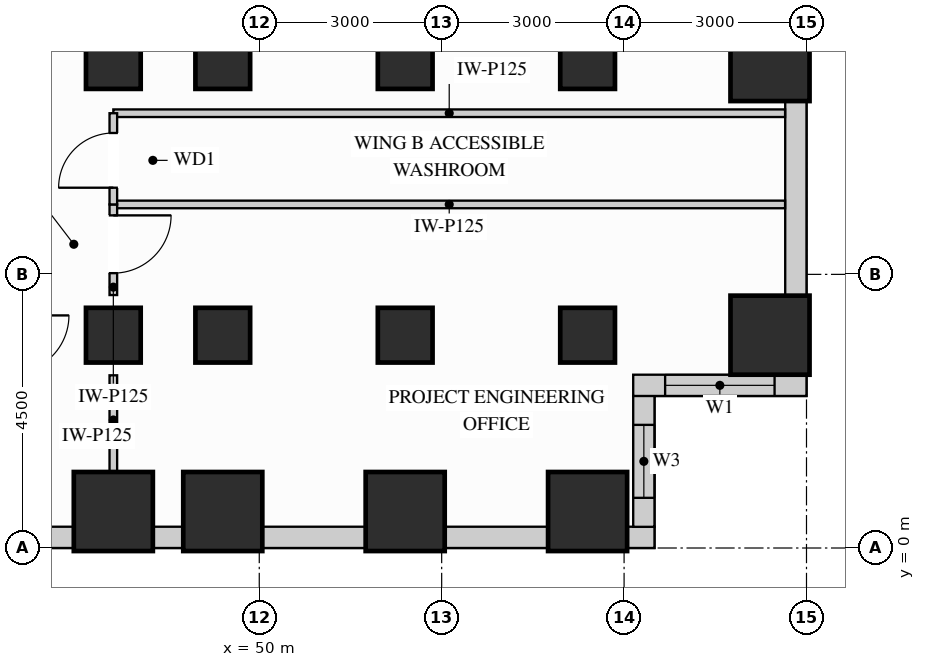
"""IFC4 building model, lengths in metres.
Left out: names, types, materials, properties, quantities, classifications, styles, units other than length and angle.
Written with IfcOpenShell. Run it as: python <this file> out.ifc"""

import sys

from ifc_helpers import new_model, si_unit, direction, frame, frame_2d, origin, origin_2d, place, context, subcontext, project, spatial, rectangle, extrude, source, transform, mapped, element, fill, save


model = new_model("IFC4")
c1 = context("Model", 3, precision=1e-05, world=origin(), true_north=direction((0.0, 1.0)))
c2 = subcontext(c1, "Body", "Model", "MODEL_VIEW")
j1 = project(units=[si_unit("LENGTHUNIT", "METRE"), si_unit("PLANEANGLEUNIT", "RADIAN")], contexts=[c1])
p1 = place(None, origin())
s1 = spatial("IfcSite", under=j1, at=p1, CompositionType="ELEMENT")
p2 = place(p1, origin())
s2 = spatial("IfcBuilding", under=s1, at=p2, CompositionType="ELEMENT")
p3 = place(p2, frame((0.0, 0.0, 22.5)))
s3 = spatial("IfcBuildingStorey", under=s2, at=p3, CompositionType="ELEMENT", Elevation=22.5)
m1 = source(origin(), c2, "Body", "SweptSolid", [
    extrude(rectangle(XDim=0.9, YDim=0.9, at=origin_2d()), origin(), (0.0, 0.0, 1.0), 3.38),
])
for number, where, z_axis, x_axis in (
    (1, (47.6, 3.5, 0.0), (0.0, 0.0, 1.0), (1.0, 0.0, 0.0)),
    (2, (47.6, 8.0, 0.0), (0.0, 0.0, 1.0), (1.0, 0.0, 0.0)),
    (3, (49.4, 3.5, 0.0), (0.0, 0.0, 1.0), (1.0, 0.0, 0.0)),
    (4, (49.4, 8.0, 0.0), (0.0, 0.0, 1.0), (1.0, 0.0, 0.0)),
    (5, (52.4, 3.5, 0.0), (0.0, 0.0, 1.0), (1.0, 0.0, 0.0)),
    (6, (52.4, 8.0, 0.0), (0.0, 0.0, 1.0), (1.0, 0.0, 0.0)),
    (7, (55.4, 3.5, 0.0), (0.0, 0.0, 1.0), (1.0, 0.0, 0.0)),
    (8, (55.4, 8.0, 0.0), (0.0, 0.0, 1.0), (1.0, 0.0, 0.0)),
):
    element("IfcColumn", number, at=place(p3, frame(where, z_axis=z_axis, x_axis=x_axis)), inside=s3, PredefinedType="COLUMN", context=c2, shape_type="MappedRepresentation", body=[
        mapped(m1, transform((0.0, 0.0, 0.0), x_axis=(1.0, 0.0, 0.0), y_axis=(0.0, 1.0, 0.0), z_axis=(0.0, 0.0, 1.0))),
    ])
m2 = source(origin(), c2, "Body", "SweptSolid", [
    extrude(rectangle(XDim=1.3, YDim=1.3, at=origin_2d()), origin(), (0.0, 0.0, 1.0), 3.38),
])
for number, where, z_axis, x_axis in (
    (9, (58.4, 3.5, 0.0), (0.0, 0.0, 1.0), (1.0, 0.0, 0.0)),
    (10, (58.4, 8.0, 0.0), (0.0, 0.0, 1.0), (1.0, 0.0, 0.0)),
    (11, (47.6, 0.6, 0.0), (0.0, 0.0, 1.0), (1.0, 0.0, 0.0)),
    (12, (49.4, 0.6, 0.0), (0.0, 0.0, 1.0), (1.0, 0.0, 0.0)),
    (13, (52.4, 0.6, 0.0), (0.0, 0.0, 1.0), (1.0, 0.0, 0.0)),
    (14, (55.4, 0.6, 0.0), (0.0, 0.0, 1.0), (1.0, 0.0, 0.0)),
):
    element("IfcColumn", number, at=place(p3, frame(where, z_axis=z_axis, x_axis=x_axis)), inside=s3, PredefinedType="COLUMN", context=c2, shape_type="MappedRepresentation", body=[
        mapped(m2, transform((0.0, 0.0, 0.0), x_axis=(1.0, 0.0, 0.0), y_axis=(0.0, 1.0, 0.0), z_axis=(0.0, 0.0, 1.0))),
    ])
p4 = place(p3, frame((40.648, 0.175, 0.0), z_axis=(0.0, 0.0, 1.0), x_axis=(1.0, 0.0, 0.0)))
e15 = element("IfcWall", 15, at=p4, inside=s3, PredefinedType="SOLIDWALL", context=c2, shape_type="SweptSolid", body=[
    extrude(rectangle(XDim=6.304, YDim=0.35, at=frame_2d((3.152, 0.0))), origin(), (0.0, 0.0, 1.0), 2.51),
])
p5 = place(p4, frame((0.687, 0.0, 0.78)))
e16 = element("IfcOpeningElement", 16, at=p5, cuts=e15, PredefinedType="OPENING", context=c2, shape_type="SweptSolid", body=[
    extrude(rectangle(XDim=1.8, YDim=1.55, at=frame_2d((0.9, 0.775))), frame((0.0, 0.185, 0.0), z_axis=(0.0, -1.0, 0.0), x_axis=(1.0, 0.0, 0.0)), (0.0, 0.0, 1.0), 0.37),
])
p6 = place(p4, frame((2.855, 0.0, 0.78)))
e17 = element("IfcOpeningElement", 17, at=p6, cuts=e15, PredefinedType="OPENING", context=c2, shape_type="SweptSolid", body=[
    extrude(rectangle(XDim=1.8, YDim=1.55, at=frame_2d((0.9, 0.775))), frame((0.0, 0.185, 0.0), z_axis=(0.0, -1.0, 0.0), x_axis=(1.0, 0.0, 0.0)), (0.0, 0.0, 1.0), 0.37),
])
m3 = source(origin(), c2, "Body", "SweptSolid", [
    extrude(rectangle(XDim=0.504, YDim=0.35, at=frame_2d((0.252, 0.0))), origin(), (0.0, 0.0, 1.0), 3.365),
])
p7 = place(p3, frame((48.248, 0.175, 0.0), z_axis=(0.0, 0.0, 1.0), x_axis=(1.0, 0.0, 0.0)))
e18 = element("IfcWall", 18, at=p7, inside=s3, PredefinedType="SOLIDWALL", context=c2, shape_type="MappedRepresentation", body=[
    mapped(m3, transform((0.0, 0.0, 0.0), x_axis=(1.0, 0.0, 0.0), y_axis=(0.0, 1.0, 0.0), z_axis=(0.0, 0.0, 1.0))),
])
m4 = source(origin(), c2, "Body", "SweptSolid", [
    extrude(rectangle(XDim=1.704, YDim=0.35, at=frame_2d((0.852, 0.0))), origin(), (0.0, 0.0, 1.0), 2.51),
])
for number, where, z_axis, x_axis in (
    (19, (50.048, 0.175, 0.0), (0.0, 0.0, 1.0), (1.0, 0.0, 0.0)),
    (20, (53.048, 0.175, 0.0), (0.0, 0.0, 1.0), (1.0, 0.0, 0.0)),
):
    element("IfcWall", number, at=place(p3, frame(where, z_axis=z_axis, x_axis=x_axis)), inside=s3, PredefinedType="SOLIDWALL", context=c2, shape_type="MappedRepresentation", body=[
        mapped(m4, transform((0.0, 0.0, 0.0), x_axis=(1.0, 0.0, 0.0), y_axis=(0.0, 1.0, 0.0), z_axis=(0.0, 0.0, 1.0))),
    ])
m5 = source(origin(), c2, "Body", "SweptSolid", [
    extrude(rectangle(XDim=0.452, YDim=0.35, at=frame_2d((0.226, 0.0))), origin(), (0.0, 0.0, 1.0), 3.365),
])
p8 = place(p3, frame((56.048, 0.175, 0.0), z_axis=(0.0, 0.0, 1.0), x_axis=(1.0, 0.0, 0.0)))
e21 = element("IfcWall", 21, at=p8, inside=s3, PredefinedType="SOLIDWALL", context=c2, shape_type="MappedRepresentation", body=[
    mapped(m5, transform((0.0, 0.0, 0.0), x_axis=(1.0, 0.0, 0.0), y_axis=(0.0, 1.0, 0.0), z_axis=(0.0, 0.0, 1.0))),
])
p9 = place(p3, frame((56.325, 0.348, 0.0), z_axis=(0.0, 0.0, 1.0), x_axis=(0.0, 1.0, 0.0)))
e22 = element("IfcWall", 22, at=p9, inside=s3, PredefinedType="SOLIDWALL", context=c2, shape_type="SweptSolid", body=[
    extrude(rectangle(XDim=2.154, YDim=0.35, at=frame_2d((1.077, 0.0))), origin(), (0.0, 0.0, 1.0), 3.365),
])
p10 = place(p9, frame((0.477, 0.0, 0.78)))
e23 = element("IfcOpeningElement", 23, at=p10, cuts=e22, PredefinedType="OPENING", context=c2, shape_type="SweptSolid", body=[
    extrude(rectangle(XDim=1.2, YDim=2.1, at=frame_2d((0.6, 1.05))), frame((0.0, 0.185, 0.0), z_axis=(0.0, -1.0, 0.0), x_axis=(1.0, 0.0, 0.0)), (0.0, 0.0, 1.0), 0.37),
])
p11 = place(p3, frame((56.15, 2.675, 0.0), z_axis=(0.0, 0.0, 1.0), x_axis=(1.0, 0.0, 0.0)))
e24 = element("IfcWall", 24, at=p11, inside=s3, PredefinedType="SOLIDWALL", context=c2, shape_type="SweptSolid", body=[
    extrude(rectangle(XDim=2.85, YDim=0.35, at=frame_2d((1.425, 0.0))), origin(), (0.0, 0.0, 1.0), 3.365),
])
p12 = place(p11, frame((0.525, 0.0, 0.78)))
e25 = element("IfcOpeningElement", 25, at=p12, cuts=e24, PredefinedType="OPENING", context=c2, shape_type="SweptSolid", body=[
    extrude(rectangle(XDim=1.8, YDim=2.1, at=frame_2d((0.9, 1.05))), frame((0.0, 0.185, 0.0), z_axis=(0.0, -1.0, 0.0), x_axis=(1.0, 0.0, 0.0)), (0.0, 0.0, 1.0), 0.37),
])
m6 = source(origin(), c2, "Body", "SweptSolid", [
    extrude(rectangle(XDim=3.204, YDim=0.35, at=frame_2d((1.602, 0.0))), origin(), (0.0, 0.0, 1.0), 2.51),
])
p13 = place(p3, frame((58.825, 4.148, 0.0), z_axis=(0.0, 0.0, 1.0), x_axis=(0.0, 1.0, 0.0)))
e26 = element("IfcWall", 26, at=p13, inside=s3, PredefinedType="SOLIDWALL", context=c2, shape_type="MappedRepresentation", body=[
    mapped(m6, transform((0.0, 0.0, 0.0), x_axis=(1.0, 0.0, 0.0), y_axis=(0.0, 1.0, 0.0), z_axis=(0.0, 0.0, 1.0))),
])
m7 = source(origin(), c2, "Body", "SweptSolid", [
    extrude(rectangle(XDim=11.048, YDim=0.125, at=frame_2d((5.524, 0.0))), origin(), (0.0, 0.0, 1.0), 3.365),
])
for number, where, z_axis, x_axis in (
    (27, (47.6, 5.65, 0.0), (0.0, 0.0, 1.0), (1.0, 0.0, 0.0)),
    (28, (47.6, 7.15, 0.0), (0.0, 0.0, 1.0), (1.0, 0.0, 0.0)),
):
    element("IfcWall", number, at=place(p3, frame(where, z_axis=z_axis, x_axis=x_axis)), inside=s3, PredefinedType="PARTITIONING", context=c2, shape_type="MappedRepresentation", body=[
        mapped(m7, transform((0.0, 0.0, 0.0), x_axis=(1.0, 0.0, 0.0), y_axis=(0.0, 1.0, 0.0), z_axis=(0.0, 0.0, 1.0))),
    ])
p14 = place(p3, frame((47.6, 4.16, 0.0), z_axis=(0.0, 0.0, 1.0), x_axis=(0.0, 1.0, 0.0)))
e29 = element("IfcWall", 29, at=p14, inside=s3, PredefinedType="PARTITIONING", context=c2, shape_type="SweptSolid", body=[
    extrude(rectangle(XDim=1.49, YDim=0.125, at=frame_2d((0.745, 0.0))), origin(), (0.0, 0.0, 1.0), 2.67),
])
p15 = place(p14, frame((0.36, 0.0, 0.0)))
e30 = element("IfcOpeningElement", 30, at=p15, cuts=e29, PredefinedType="OPENING", context=c2, shape_type="SweptSolid", body=[
    extrude(rectangle(XDim=0.95, YDim=2.15, at=frame_2d((0.475, 1.075))), frame((0.0, 0.073, 0.0), z_axis=(0.0, -1.0, 0.0), x_axis=(1.0, 0.0, 0.0)), (0.0, 0.0, 1.0), 0.145),
])
m8 = source(origin(), c2, "Body", "SweptSolid", [
    extrude(rectangle(XDim=1.58, YDim=0.125, at=frame_2d((0.79, 0.0))), origin(), (0.0, 0.0, 1.0), 2.67),
])
p16 = place(p3, frame((47.6, 1.26, 0.0), z_axis=(0.0, 0.0, 1.0), x_axis=(0.0, 1.0, 0.0)))
e31 = element("IfcWall", 31, at=p16, inside=s3, PredefinedType="PARTITIONING", context=c2, shape_type="MappedRepresentation", body=[
    mapped(m8, transform((0.0, 0.0, 0.0), x_axis=(1.0, 0.0, 0.0), y_axis=(0.0, 1.0, 0.0), z_axis=(0.0, 0.0, 1.0))),
])
p17 = place(p3, frame((47.6, 5.65, 0.0), z_axis=(0.0, 0.0, 1.0), x_axis=(0.0, 1.0, 0.0)))
e32 = element("IfcWall", 32, at=p17, inside=s3, PredefinedType="PARTITIONING", context=c2, shape_type="SweptSolid", body=[
    extrude(rectangle(XDim=1.5, YDim=0.125, at=frame_2d((0.75, 0.0))), origin(), (0.0, 0.0, 1.0), 2.67),
])
p18 = place(p17, frame((0.275, 0.0, 0.0)))
e33 = element("IfcOpeningElement", 33, at=p18, cuts=e32, PredefinedType="OPENING", context=c2, shape_type="SweptSolid", body=[
    extrude(rectangle(XDim=0.9, YDim=2.15, at=frame_2d((0.45, 1.075))), frame((0.0, 0.073, 0.0), z_axis=(0.0, -1.0, 0.0), x_axis=(1.0, 0.0, 0.0)), (0.0, 0.0, 1.0), 0.145),
])
m9 = source(origin(), c2, "Body", "SweptSolid", [
    extrude(rectangle(XDim=0.95, YDim=2.15, at=frame_2d((0.475, 1.075))), frame((0.0, 0.025, 0.0), z_axis=(0.0, -1.0, 0.0), x_axis=(1.0, 0.0, 0.0)), (0.0, 0.0, 1.0), 0.05),
])
p19 = place(p15, origin())
e34 = element("IfcDoor", 34, at=p19, inside=s3, OperationType="SINGLE_SWING_RIGHT", PredefinedType="DOOR", context=c2, shape_type="MappedRepresentation", body=[
    mapped(m9, transform((0.0, 0.0, 0.0), x_axis=(1.0, 0.0, 0.0), y_axis=(0.0, 1.0, 0.0), z_axis=(0.0, 0.0, 1.0))),
])
fill(e30, e34)
m10 = source(origin(), c2, "Body", "SweptSolid", [
    extrude(rectangle(XDim=0.9, YDim=2.15, at=frame_2d((0.45, 1.075))), frame((0.0, 0.025, 0.0), z_axis=(0.0, -1.0, 0.0), x_axis=(1.0, 0.0, 0.0)), (0.0, 0.0, 1.0), 0.05),
])
p20 = place(p18, origin())
e35 = element("IfcDoor", 35, at=p20, inside=s3, OperationType="SINGLE_SWING_LEFT", PredefinedType="DOOR", context=c2, shape_type="MappedRepresentation", body=[
    mapped(m10, transform((0.0, 0.0, 0.0), x_axis=(1.0, 0.0, 0.0), y_axis=(0.0, 1.0, 0.0), z_axis=(0.0, 0.0, 1.0))),
])
fill(e33, e35)
m11 = source(origin(), c2, "Body", "SweptSolid", [
    extrude(rectangle(XDim=1.8, YDim=2.1, at=frame_2d((0.9, 1.05))), frame((0.0, 0.03, 0.0), z_axis=(0.0, -1.0, 0.0), x_axis=(1.0, 0.0, 0.0)), (0.0, 0.0, 1.0), 0.06),
])
p21 = place(p12, origin())
e36 = element("IfcWindow", 36, at=p21, inside=s3, PartitioningType="SINGLE_PANEL", PredefinedType="WINDOW", context=c2, shape_type="MappedRepresentation", body=[
    mapped(m11, transform((0.0, 0.0, 0.0), x_axis=(1.0, 0.0, 0.0), y_axis=(0.0, 1.0, 0.0), z_axis=(0.0, 0.0, 1.0))),
])
fill(e25, e36)
m12 = source(origin(), c2, "Body", "SweptSolid", [
    extrude(rectangle(XDim=1.2, YDim=2.1, at=frame_2d((0.6, 1.05))), frame((0.0, 0.03, 0.0), z_axis=(0.0, -1.0, 0.0), x_axis=(1.0, 0.0, 0.0)), (0.0, 0.0, 1.0), 0.06),
])
p22 = place(p10, origin())
e37 = element("IfcWindow", 37, at=p22, inside=s3, PartitioningType="SINGLE_PANEL", PredefinedType="WINDOW", context=c2, shape_type="MappedRepresentation", body=[
    mapped(m12, transform((0.0, 0.0, 0.0), x_axis=(1.0, 0.0, 0.0), y_axis=(0.0, 1.0, 0.0), z_axis=(0.0, 0.0, 1.0))),
])
fill(e23, e37)
save(model, sys.argv[1])
